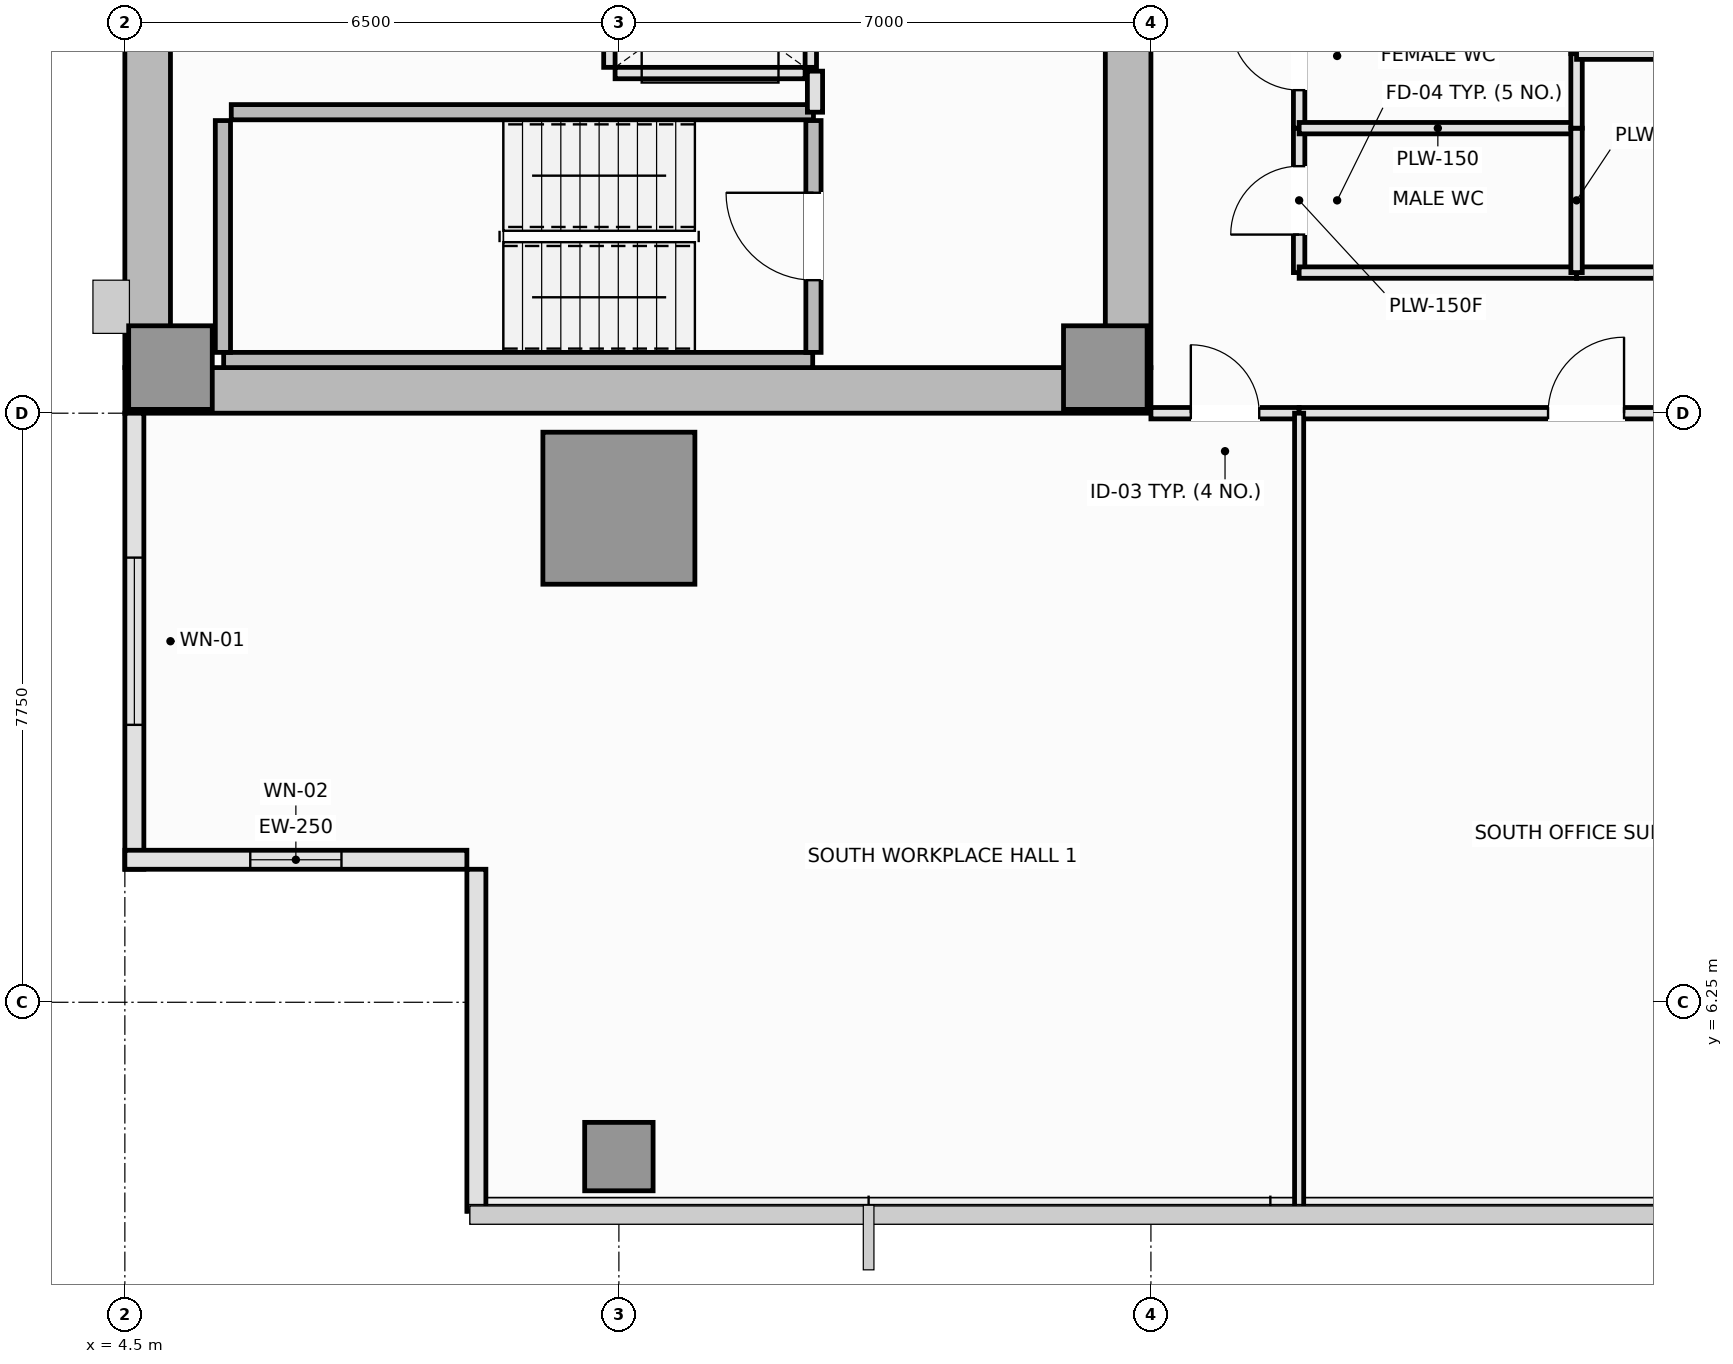
"""IFC4 building model, lengths in metres.
Left out: names, types, materials, properties, quantities, classifications, styles, units other than length and angle.
Written with IfcOpenShell. Run it as: python <this file> out.ifc"""

import sys

from ifc_helpers import new_model, si_unit, direction, frame, frame_2d, origin, origin_2d, place, context, subcontext, project, spatial, rectangle, extrude, element, fill, save


model = new_model("IFC4")
c1 = context("Model", 3, precision=1e-05, world=origin(), true_north=direction((0.0, 1.0)))
c2 = subcontext(c1, "Body", "Model", "MODEL_VIEW")
j1 = project(units=[si_unit("LENGTHUNIT", "METRE"), si_unit("PLANEANGLEUNIT", "RADIAN")], contexts=[c1])
p1 = place(None, origin())
s1 = spatial("IfcSite", under=j1, at=p1, CompositionType="ELEMENT")
p2 = place(p1, origin())
s2 = spatial("IfcBuilding", under=s1, at=p2, CompositionType="ELEMENT")
p3 = place(p2, frame((0.0, 0.0, 166.15)))
s3 = spatial("IfcBuildingStorey", under=s2, at=p3, CompositionType="ELEMENT", Elevation=166.15)
p4 = place(p3, frame((4.5, 14.3, 0.0), z_axis=(0.0, 0.0, 1.0), x_axis=(1.0, 0.0, 0.0)))
e1 = element("IfcWall", 1, at=p4, inside=s3, PredefinedType="SHEAR", context=c2, shape_type="SweptSolid", body=[
    extrude(rectangle(XDim=13.5, YDim=0.6, at=frame_2d((6.75, 0.0))), origin(), (0.0, 0.0, 1.0), 3.55),
])
p5 = place(p3, frame((4.8, 14.6, 0.0), z_axis=(0.0, 0.0, 1.0), x_axis=(0.0, 1.0, 0.0)))
e2 = element("IfcWall", 2, at=p5, inside=s3, PredefinedType="SHEAR", context=c2, shape_type="SweptSolid", body=[
    extrude(rectangle(XDim=21.3, YDim=0.6, at=frame_2d((10.65, 0.0))), origin(), (0.0, 0.0, 1.0), 3.55),
])
p6 = place(p3, frame((17.7, 14.6, 0.0), z_axis=(0.0, 0.0, 1.0), x_axis=(0.0, 1.0, 0.0)))
e3 = element("IfcWall", 3, at=p6, inside=s3, PredefinedType="SHEAR", context=c2, shape_type="SweptSolid", body=[
    extrude(rectangle(XDim=8.85, YDim=0.6, at=frame_2d((4.425, 0.0))), origin(), (0.0, 0.0, 1.0), 3.55),
])
p7 = place(p6, frame((4.3, 0.0, 0.0)))
e4 = element("IfcOpeningElement", 4, at=p7, cuts=e3, PredefinedType="OPENING", context=c2, shape_type="SweptSolid", body=[
    extrude(rectangle(XDim=1.1, YDim=2.15, at=frame_2d((0.55, 1.075))), frame((0.0, 0.31, 0.0), z_axis=(0.0, -1.0, 0.0), x_axis=(1.0, 0.0, 0.0)), (0.0, 0.0, 1.0), 0.62),
])
for number, where, z_axis, x_axis in (
    (5, (5.1, 14.6, 0.0), (0.0, 0.0, 1.0), (1.0, 0.0, 0.0)),
    (6, (17.4, 14.6, 0.0), (0.0, 0.0, 1.0), (1.0, 0.0, 0.0)),
):
    element("IfcColumn", number, at=place(p3, frame(where, z_axis=z_axis, x_axis=x_axis)), inside=s3, PredefinedType="PILASTER", context=c2, shape_type="SweptSolid", body=[
        extrude(rectangle(XDim=1.1, YDim=1.1, at=origin_2d()), origin(), (0.0, 0.0, 1.0), 3.55),
    ])
p8 = place(p3, frame((11.0, 12.75, 0.0), z_axis=(0.0, 0.0, 1.0), x_axis=(1.0, 0.0, 0.0)))
e7 = element("IfcColumn", 7, at=p8, inside=s3, PredefinedType="COLUMN", context=c2, shape_type="SweptSolid", body=[
    extrude(rectangle(XDim=2.0, YDim=2.0, at=origin_2d()), origin(), (0.0, 0.0, 1.0), 3.55),
])
p9 = place(p3, frame((11.0, 4.22, 0.0), z_axis=(0.0, 0.0, 1.0), x_axis=(1.0, 0.0, 0.0)))
e8 = element("IfcColumn", 8, at=p9, inside=s3, PredefinedType="COLUMN", context=c2, shape_type="SweptSolid", body=[
    extrude(rectangle(XDim=0.9, YDim=0.9, at=origin_2d()), origin(), (0.0, 0.0, 1.0), 3.55),
])
p10 = place(p3, frame((4.625, 14.0, 0.0), z_axis=(0.0, 0.0, 1.0), x_axis=(0.0, -1.0, 0.0)))
e9 = element("IfcWall", 9, at=p10, inside=s3, PredefinedType="SOLIDWALL", context=c2, shape_type="SweptSolid", body=[
    extrude(rectangle(XDim=6.0, YDim=0.25, at=frame_2d((3.0, 0.0))), origin(), (0.0, 0.0, 1.0), 3.37),
])
p11 = place(p10, frame((1.9, 0.0, 0.9)))
e10 = element("IfcOpeningElement", 10, at=p11, cuts=e9, PredefinedType="OPENING", context=c2, shape_type="SweptSolid", body=[
    extrude(rectangle(XDim=2.2, YDim=1.8, at=frame_2d((1.1, 0.9))), frame((0.0, 0.135, 0.0), z_axis=(0.0, -1.0, 0.0), x_axis=(1.0, 0.0, 0.0)), (0.0, 0.0, 1.0), 0.27),
])
p12 = place(p3, frame((4.5, 8.125, 0.0), z_axis=(0.0, 0.0, 1.0), x_axis=(1.0, 0.0, 0.0)))
e11 = element("IfcWall", 11, at=p12, inside=s3, PredefinedType="SOLIDWALL", context=c2, shape_type="SweptSolid", body=[
    extrude(rectangle(XDim=4.5, YDim=0.25, at=frame_2d((2.25, 0.0))), origin(), (0.0, 0.0, 1.0), 3.37),
])
p13 = place(p12, frame((1.65, 0.0, 0.9)))
e12 = element("IfcOpeningElement", 12, at=p13, cuts=e11, PredefinedType="OPENING", context=c2, shape_type="SweptSolid", body=[
    extrude(rectangle(XDim=1.2, YDim=1.8, at=frame_2d((0.6, 0.9))), frame((0.0, 0.135, 0.0), z_axis=(0.0, -1.0, 0.0), x_axis=(1.0, 0.0, 0.0)), (0.0, 0.0, 1.0), 0.27),
])
p14 = place(p3, frame((9.125, 8.0, 0.0), z_axis=(0.0, 0.0, 1.0), x_axis=(0.0, -1.0, 0.0)))
e13 = element("IfcWall", 13, at=p14, inside=s3, PredefinedType="SOLIDWALL", context=c2, shape_type="SweptSolid", body=[
    extrude(rectangle(XDim=4.5, YDim=0.25, at=frame_2d((2.25, 0.0))), origin(), (0.0, 0.0, 1.0), 3.37),
])
p15 = place(p3, frame((5.8, 14.7, 0.0), z_axis=(0.0, 0.0, 1.0), x_axis=(1.0, 0.0, 0.0)))
e14 = element("IfcWall", 14, at=p15, inside=s3, PredefinedType="SOLIDWALL", context=c2, shape_type="SweptSolid", body=[
    extrude(rectangle(XDim=7.75, YDim=0.2, at=frame_2d((3.875, 0.0))), origin(), (0.0, 0.0, 1.0), 3.55),
])
p16 = place(p3, frame((5.79, 14.8, 0.0), z_axis=(0.0, 0.0, 1.0), x_axis=(0.0, 1.0, 0.0)))
e15 = element("IfcWall", 15, at=p16, inside=s3, PredefinedType="SOLIDWALL", context=c2, shape_type="SweptSolid", body=[
    extrude(rectangle(XDim=3.05, YDim=0.2, at=frame_2d((1.525, 0.0))), origin(), (0.0, 0.0, 1.0), 3.55),
])
p17 = place(p3, frame((5.9, 17.96, 0.0), z_axis=(0.0, 0.0, 1.0), x_axis=(1.0, 0.0, 0.0)))
e16 = element("IfcWall", 16, at=p17, inside=s3, PredefinedType="SOLIDWALL", context=c2, shape_type="SweptSolid", body=[
    extrude(rectangle(XDim=7.66, YDim=0.2, at=frame_2d((3.83, 0.0))), origin(), (0.0, 0.0, 1.0), 3.55),
])
p18 = place(p3, frame((13.56, 14.8, 0.0), z_axis=(0.0, 0.0, 1.0), x_axis=(0.0, 1.0, 0.0)))
e17 = element("IfcWall", 17, at=p18, inside=s3, PredefinedType="SOLIDWALL", context=c2, shape_type="SweptSolid", body=[
    extrude(rectangle(XDim=3.05, YDim=0.2, at=frame_2d((1.525, 0.0))), origin(), (0.0, 0.0, 1.0), 3.55),
])
p19 = place(p18, frame((0.95, 0.0, 0.0)))
e18 = element("IfcOpeningElement", 18, at=p19, cuts=e17, PredefinedType="OPENING", context=c2, shape_type="SweptSolid", body=[
    extrude(rectangle(XDim=1.15, YDim=2.15, at=frame_2d((0.575, 1.075))), frame((0.0, 0.11, 0.0), z_axis=(0.0, -1.0, 0.0), x_axis=(1.0, 0.0, 0.0)), (0.0, 0.0, 1.0), 0.22),
])
p20 = place(p3, frame((10.95, 18.475, 0.0), z_axis=(0.0, 0.0, 1.0), x_axis=(1.0, 0.0, 0.0)))
e19 = element("IfcWall", 19, at=p20, inside=s3, PredefinedType="PARTITIONING", context=c2, shape_type="SweptSolid", body=[
    extrude(rectangle(XDim=2.5, YDim=0.15, at=frame_2d((1.25, 0.0))), origin(), (0.0, 0.0, 1.0), 3.37),
])
p21 = place(p3, frame((10.875, 18.55, 0.0), z_axis=(0.0, 0.0, 1.0), x_axis=(0.0, 1.0, 0.0)))
e20 = element("IfcWall", 20, at=p21, inside=s3, PredefinedType="PARTITIONING", context=c2, shape_type="SweptSolid", body=[
    extrude(rectangle(XDim=1.8, YDim=0.15, at=frame_2d((0.9, 0.0))), origin(), (0.0, 0.0, 1.0), 3.37),
])
p22 = place(p3, frame((13.525, 18.55, 0.0), z_axis=(0.0, 0.0, 1.0), x_axis=(0.0, 1.0, 0.0)))
e21 = element("IfcWall", 21, at=p22, inside=s3, PredefinedType="PARTITIONING", context=c2, shape_type="SweptSolid", body=[
    extrude(rectangle(XDim=1.8, YDim=0.15, at=frame_2d((0.9, 0.0))), origin(), (0.0, 0.0, 1.0), 3.37),
])
p23 = place(p22, frame((0.35, 0.0, 0.0)))
e22 = element("IfcOpeningElement", 22, at=p23, cuts=e21, PredefinedType="OPENING", context=c2, shape_type="SweptSolid", body=[
    extrude(rectangle(XDim=1.1, YDim=2.2, at=frame_2d((0.55, 1.1))), frame((0.0, 0.085, 0.0), z_axis=(0.0, -1.0, 0.0), x_axis=(1.0, 0.0, 0.0)), (0.0, 0.0, 1.0), 0.17),
])
p24 = place(p3, frame((13.58, 17.96, 0.0), z_axis=(0.0, 0.0, 1.0), x_axis=(0.0, 1.0, 0.0)))
e23 = element("IfcWall", 23, at=p24, inside=s3, PredefinedType="PARTITIONING", context=c2, shape_type="SweptSolid", body=[
    extrude(rectangle(XDim=0.54, YDim=0.2, at=frame_2d((0.27, 0.0))), origin(), (0.0, 0.0, 1.0), 3.37),
])
p25 = place(p3, frame((19.95, 15.85, 0.0), z_axis=(0.0, 0.0, 1.0), x_axis=(0.0, 1.0, 0.0)))
e24 = element("IfcWall", 24, at=p25, inside=s3, PredefinedType="PLUMBINGWALL", context=c2, shape_type="SweptSolid", body=[
    extrude(rectangle(XDim=1.9, YDim=0.15, at=frame_2d((0.95, 0.0))), origin(), (0.0, 0.0, 1.0), 3.37),
])
p26 = place(p25, frame((0.5, 0.0, 0.0)))
e25 = element("IfcOpeningElement", 25, at=p26, cuts=e24, PredefinedType="OPENING", context=c2, shape_type="SweptSolid", body=[
    extrude(rectangle(XDim=0.9, YDim=2.1, at=frame_2d((0.45, 1.05))), frame((0.0, 0.085, 0.0), z_axis=(0.0, -1.0, 0.0), x_axis=(1.0, 0.0, 0.0)), (0.0, 0.0, 1.0), 0.17),
])
p27 = place(p3, frame((19.95, 17.75, 0.0), z_axis=(0.0, 0.0, 1.0), x_axis=(0.0, 1.0, 0.0)))
e26 = element("IfcWall", 26, at=p27, inside=s3, PredefinedType="PLUMBINGWALL", context=c2, shape_type="SweptSolid", body=[
    extrude(rectangle(XDim=1.9, YDim=0.15, at=frame_2d((0.95, 0.0))), origin(), (0.0, 0.0, 1.0), 3.37),
])
p28 = place(p27, frame((0.5, 0.0, 0.0)))
e27 = element("IfcOpeningElement", 27, at=p28, cuts=e26, PredefinedType="OPENING", context=c2, shape_type="SweptSolid", body=[
    extrude(rectangle(XDim=0.9, YDim=2.1, at=frame_2d((0.45, 1.05))), frame((0.0, 0.085, 0.0), z_axis=(0.0, -1.0, 0.0), x_axis=(1.0, 0.0, 0.0)), (0.0, 0.0, 1.0), 0.17),
])
p29 = place(p3, frame((18.0, 14.0, 0.0), z_axis=(0.0, 0.0, 1.0), x_axis=(1.0, 0.0, 0.0)))
e28 = element("IfcWall", 28, at=p29, inside=s3, PredefinedType="PARTITIONING", context=c2, shape_type="SweptSolid", body=[
    extrude(rectangle(XDim=1.95, YDim=0.15, at=frame_2d((0.975, 0.0))), origin(), (0.0, 0.0, 1.0), 3.37),
])
p30 = place(p29, frame((0.525, 0.0, 0.0)))
e29 = element("IfcOpeningElement", 29, at=p30, cuts=e28, PredefinedType="OPENING", context=c2, shape_type="SweptSolid", body=[
    extrude(rectangle(XDim=0.9, YDim=2.1, at=frame_2d((0.45, 1.05))), frame((0.0, 0.085, 0.0), z_axis=(0.0, -1.0, 0.0), x_axis=(1.0, 0.0, 0.0)), (0.0, 0.0, 1.0), 0.17),
])
p31 = place(p3, frame((19.95, 15.85, 0.0), z_axis=(0.0, 0.0, 1.0), x_axis=(1.0, 0.0, 0.0)))
e30 = element("IfcWall", 30, at=p31, inside=s3, PredefinedType="PLUMBINGWALL", context=c2, shape_type="SweptSolid", body=[
    extrude(rectangle(XDim=3.65, YDim=0.15, at=frame_2d((1.825, 0.0))), origin(), (0.0, 0.0, 1.0), 3.37),
])
p32 = place(p3, frame((23.6, 15.85, 0.0), z_axis=(0.0, 0.0, 1.0), x_axis=(1.0, 0.0, 0.0)))
e31 = element("IfcWall", 31, at=p32, inside=s3, PredefinedType="PLUMBINGWALL", context=c2, shape_type="SweptSolid", body=[
    extrude(rectangle(XDim=3.9, YDim=0.15, at=frame_2d((1.95, 0.0))), origin(), (0.0, 0.0, 1.0), 3.37),
])
p33 = place(p32, frame((1.5, 0.0, 0.0)))
e32 = element("IfcOpeningElement", 32, at=p33, cuts=e31, PredefinedType="OPENING", context=c2, shape_type="SweptSolid", body=[
    extrude(rectangle(XDim=0.9, YDim=2.1, at=frame_2d((0.45, 1.05))), frame((0.0, 0.085, 0.0), z_axis=(0.0, -1.0, 0.0), x_axis=(1.0, 0.0, 0.0)), (0.0, 0.0, 1.0), 0.17),
])
p34 = place(p3, frame((19.95, 14.0, 0.0), z_axis=(0.0, 0.0, 1.0), x_axis=(1.0, 0.0, 0.0)))
e33 = element("IfcWall", 33, at=p34, inside=s3, PredefinedType="PARTITIONING", context=c2, shape_type="SweptSolid", body=[
    extrude(rectangle(XDim=7.55, YDim=0.15, at=frame_2d((3.775, 0.0))), origin(), (0.0, 0.0, 1.0), 3.37),
])
p35 = place(p34, frame((3.275, 0.0, 0.0)))
e34 = element("IfcOpeningElement", 34, at=p35, cuts=e33, PredefinedType="OPENING", context=c2, shape_type="SweptSolid", body=[
    extrude(rectangle(XDim=1.0, YDim=2.15, at=frame_2d((0.5, 1.075))), frame((0.0, 0.085, 0.0), z_axis=(0.0, -1.0, 0.0), x_axis=(1.0, 0.0, 0.0)), (0.0, 0.0, 1.0), 0.17),
])
p36 = place(p3, frame((19.95, 17.75, 0.0), z_axis=(0.0, 0.0, 1.0), x_axis=(1.0, 0.0, 0.0)))
e35 = element("IfcWall", 35, at=p36, inside=s3, PredefinedType="PLUMBINGWALL", context=c2, shape_type="SweptSolid", body=[
    extrude(rectangle(XDim=3.65, YDim=0.15, at=frame_2d((1.825, 0.0))), origin(), (0.0, 0.0, 1.0), 3.37),
])
p37 = place(p3, frame((23.6, 15.85, 0.0), z_axis=(0.0, 0.0, 1.0), x_axis=(0.0, 1.0, 0.0)))
e36 = element("IfcWall", 36, at=p37, inside=s3, PredefinedType="PLUMBINGWALL", context=c2, shape_type="SweptSolid", body=[
    extrude(rectangle(XDim=1.9, YDim=0.15, at=frame_2d((0.95, 0.0))), origin(), (0.0, 0.0, 1.0), 3.37),
])
p38 = place(p3, frame((23.6, 17.75, 0.0), z_axis=(0.0, 0.0, 1.0), x_axis=(0.0, 1.0, 0.0)))
e37 = element("IfcWall", 37, at=p38, inside=s3, PredefinedType="PLUMBINGWALL", context=c2, shape_type="SweptSolid", body=[
    extrude(rectangle(XDim=0.98, YDim=0.15, at=frame_2d((0.49, 0.0))), origin(), (0.0, 0.0, 1.0), 3.37),
])
p39 = place(p3, frame((23.6, 18.73, 0.0), z_axis=(0.0, 0.0, 1.0), x_axis=(0.0, 1.0, 0.0)))
e38 = element("IfcWall", 38, at=p39, inside=s3, PredefinedType="PLUMBINGWALL", context=c2, shape_type="SweptSolid", body=[
    extrude(rectangle(XDim=0.92, YDim=0.15, at=frame_2d((0.46, 0.0))), origin(), (0.0, 0.0, 1.0), 3.37),
])
p40 = place(p3, frame((23.6, 18.73, 0.0), z_axis=(0.0, 0.0, 1.0), x_axis=(1.0, 0.0, 0.0)))
e39 = element("IfcWall", 39, at=p40, inside=s3, PredefinedType="PLUMBINGWALL", context=c2, shape_type="SweptSolid", body=[
    extrude(rectangle(XDim=3.9, YDim=0.15, at=frame_2d((1.95, 0.0))), origin(), (0.0, 0.0, 1.0), 3.37),
])
p41 = place(p3, frame((19.95, 3.51, 0.0), z_axis=(0.0, 0.0, 1.0), x_axis=(0.0, 1.0, 0.0)))
e40 = element("IfcWall", 40, at=p41, inside=s3, PredefinedType="PARTITIONING", context=c2, shape_type="SweptSolid", body=[
    extrude(rectangle(XDim=10.49, YDim=0.12, at=frame_2d((5.245, 0.0))), origin(), (0.0, 0.0, 1.0), 3.37),
])
p42 = place(p11, origin())
e41 = element("IfcWindow", 41, at=p42, inside=s3, PartitioningType="SINGLE_PANEL", PredefinedType="WINDOW", context=c2, shape_type="SweptSolid", body=[
    extrude(rectangle(XDim=2.2, YDim=1.8, at=frame_2d((1.1, 0.9))), frame((0.0, 0.03, 0.0), z_axis=(0.0, -1.0, 0.0), x_axis=(1.0, 0.0, 0.0)), (0.0, 0.0, 1.0), 0.06),
])
fill(e10, e41)
p43 = place(p13, origin())
e42 = element("IfcWindow", 42, at=p43, inside=s3, PartitioningType="SINGLE_PANEL", PredefinedType="WINDOW", context=c2, shape_type="SweptSolid", body=[
    extrude(rectangle(XDim=1.2, YDim=1.8, at=frame_2d((0.6, 0.9))), frame((0.0, 0.03, 0.0), z_axis=(0.0, -1.0, 0.0), x_axis=(1.0, 0.0, 0.0)), (0.0, 0.0, 1.0), 0.06),
])
fill(e12, e42)
p44 = place(p19, origin())
e43 = element("IfcDoor", 43, at=p44, inside=s3, OperationType="SINGLE_SWING_RIGHT", PredefinedType="DOOR", context=c2, shape_type="SweptSolid", body=[
    extrude(rectangle(XDim=1.15, YDim=2.15, at=frame_2d((0.575, 1.075))), frame((0.0, 0.025, 0.0), z_axis=(0.0, -1.0, 0.0), x_axis=(1.0, 0.0, 0.0)), (0.0, 0.0, 1.0), 0.05),
])
fill(e18, e43)
p45 = place(p26, origin())
e44 = element("IfcDoor", 44, at=p45, inside=s3, OperationType="SINGLE_SWING_LEFT", PredefinedType="DOOR", context=c2, shape_type="SweptSolid", body=[
    extrude(rectangle(XDim=0.9, YDim=2.1, at=frame_2d((0.45, 1.05))), frame((0.0, 0.025, 0.0), z_axis=(0.0, -1.0, 0.0), x_axis=(1.0, 0.0, 0.0)), (0.0, 0.0, 1.0), 0.05),
])
fill(e25, e44)
p46 = place(p28, origin())
e45 = element("IfcDoor", 45, at=p46, inside=s3, OperationType="SINGLE_SWING_RIGHT", PredefinedType="DOOR", context=c2, shape_type="SweptSolid", body=[
    extrude(rectangle(XDim=0.9, YDim=2.1, at=frame_2d((0.45, 1.05))), frame((0.0, 0.025, 0.0), z_axis=(0.0, -1.0, 0.0), x_axis=(1.0, 0.0, 0.0)), (0.0, 0.0, 1.0), 0.05),
])
fill(e27, e45)
p47 = place(p30, origin())
e46 = element("IfcDoor", 46, at=p47, inside=s3, OperationType="SINGLE_SWING_LEFT", PredefinedType="DOOR", context=c2, shape_type="SweptSolid", body=[
    extrude(rectangle(XDim=0.9, YDim=2.1, at=frame_2d((0.45, 1.05))), frame((0.0, 0.025, 0.0), z_axis=(0.0, -1.0, 0.0), x_axis=(1.0, 0.0, 0.0)), (0.0, 0.0, 1.0), 0.05),
])
fill(e29, e46)
p48 = place(p35, origin())
e47 = element("IfcDoor", 47, at=p48, inside=s3, OperationType="SINGLE_SWING_RIGHT", PredefinedType="DOOR", context=c2, shape_type="SweptSolid", body=[
    extrude(rectangle(XDim=1.0, YDim=2.15, at=frame_2d((0.5, 1.075))), frame((0.0, 0.025, 0.0), z_axis=(0.0, -1.0, 0.0), x_axis=(1.0, 0.0, 0.0)), (0.0, 0.0, 1.0), 0.05),
])
fill(e34, e47)
save(model, sys.argv[1])
